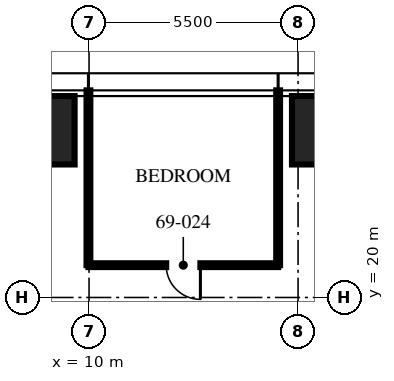
"""IFC4 building model, lengths in metres.
Left out: names, types, materials, properties, quantities, classifications, styles, units other than length and angle.
Written with IfcOpenShell. Run it as: python <this file> out.ifc"""

import sys

from ifc_helpers import new_model, si_unit, direction, frame, frame_2d, origin, origin_2d, place, context, subcontext, project, spatial, rectangle, hollow_rectangle, extrude, element, fill, save


model = new_model("IFC4")
c1 = context("Model", 3, precision=1e-05, world=origin(), true_north=direction((0.0, 1.0)))
c2 = subcontext(c1, "Body", "Model", "MODEL_VIEW")
j1 = project(units=[si_unit("LENGTHUNIT", "METRE"), si_unit("PLANEANGLEUNIT", "RADIAN")], contexts=[c1])
p1 = place(None, origin())
s1 = spatial("IfcSite", under=j1, at=p1, CompositionType="ELEMENT")
p2 = place(p1, origin())
s2 = spatial("IfcBuilding", under=s1, at=p2, CompositionType="ELEMENT")
p3 = place(p2, frame((0.0, 0.0, 274.5)))
s3 = spatial("IfcBuildingStorey", under=s2, at=p3, CompositionType="ELEMENT", Elevation=274.5)
p4 = place(p3, frame((8.32, 24.4, 0.0), z_axis=(0.0, 0.0, 1.0), x_axis=(1.0, 0.0, 0.0)))
e1 = element("IfcColumn", 1, at=p4, inside=s3, PredefinedType="COLUMN", context=c2, shape_type="SweptSolid", body=[
    extrude(hollow_rectangle(XDim=2.6, YDim=1.8, WallThickness=0.14, at=origin_2d()), origin(), (0.0, 0.0, 1.0), 2.64),
])
p5 = place(p3, frame((16.64, 24.4, 0.0), z_axis=(0.0, 0.0, 1.0), x_axis=(1.0, 0.0, 0.0)))
e2 = element("IfcColumn", 2, at=p5, inside=s3, PredefinedType="COLUMN", context=c2, shape_type="SweptSolid", body=[
    extrude(hollow_rectangle(XDim=2.6, YDim=1.8, WallThickness=0.14, at=origin_2d()), origin(), (0.0, 0.0, 1.0), 2.51),
])
for number, where, z_axis, x_axis in (
    (3, (14.976, 20.85, 0.0), (0.0, 0.0, 1.0), (0.0, 1.0, 0.0)),
    (4, (9.984, 20.85, 0.0), (0.0, 0.0, 1.0), (0.0, 1.0, 0.0)),
):
    element("IfcWall", number, at=place(p3, frame(where, z_axis=z_axis, x_axis=x_axis)), inside=s3, PredefinedType="PARTITIONING", context=c2, shape_type="SweptSolid", body=[
        extrude(rectangle(XDim=4.6, YDim=0.1, at=frame_2d((2.3, 0.0))), origin(), (0.0, 0.0, 1.0), 2.75),
    ])
p6 = place(p3, frame((14.976, 20.85, 0.0), z_axis=(0.0, 0.0, 1.0), x_axis=(-1.0, 0.0, 0.0)))
e5 = element("IfcWall", 5, at=p6, inside=s3, PredefinedType="PARTITIONING", context=c2, shape_type="SweptSolid", body=[
    extrude(rectangle(XDim=4.992, YDim=0.1, at=frame_2d((2.496, 0.0))), origin(), (0.0, 0.0, 1.0), 2.2),
])
p7 = place(p6, frame((2.046, 0.0, 0.0)))
e6 = element("IfcOpeningElement", 6, at=p7, cuts=e5, PredefinedType="OPENING", context=c2, shape_type="SweptSolid", body=[
    extrude(rectangle(XDim=0.9, YDim=2.1, at=frame_2d((0.45, 1.05))), frame((0.0, 0.06, 0.0), z_axis=(0.0, -1.0, 0.0), x_axis=(1.0, 0.0, 0.0)), (0.0, 0.0, 1.0), 0.12),
])
p8 = place(p7, origin())
e7 = element("IfcDoor", 7, at=p8, inside=s3, OperationType="SINGLE_SWING_LEFT", PredefinedType="DOOR", context=c2, shape_type="SweptSolid", body=[
    extrude(rectangle(XDim=0.9, YDim=2.1, at=frame_2d((0.45, 1.05))), frame((0.0, 0.025, 0.0), z_axis=(0.0, -1.0, 0.0), x_axis=(1.0, 0.0, 0.0)), (0.0, 0.0, 1.0), 0.05),
])
fill(e6, e7)
save(model, sys.argv[1])
